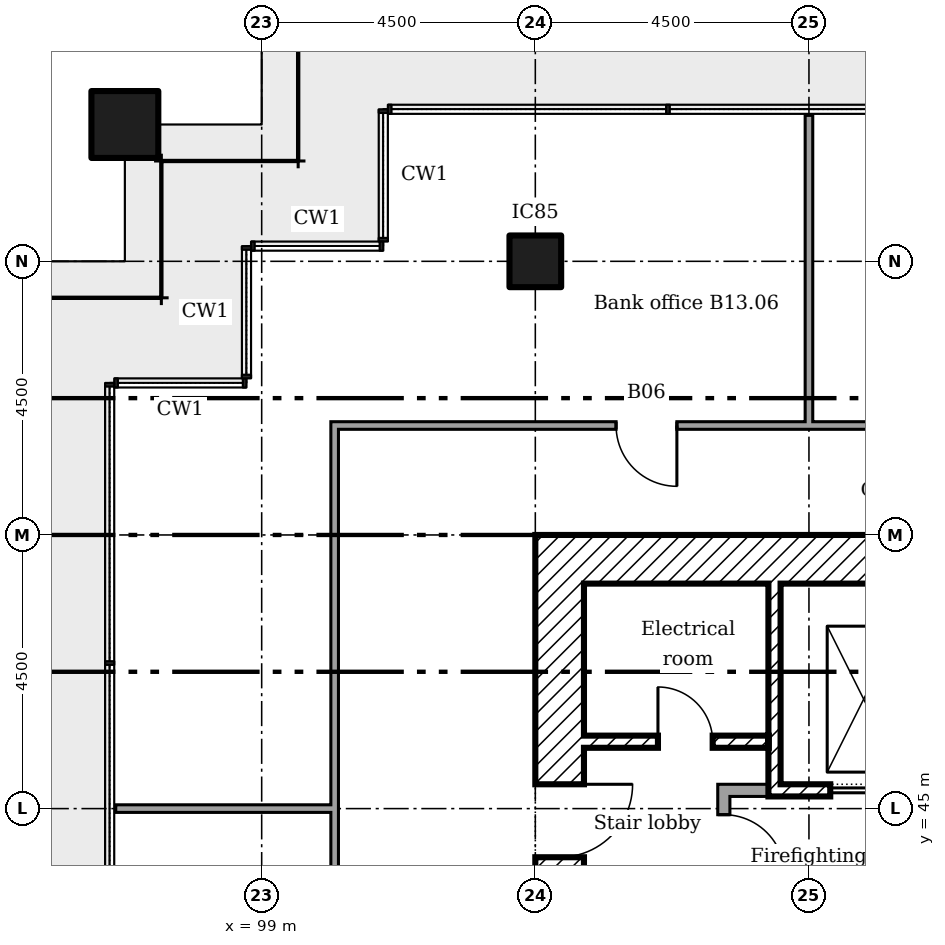
"""IFC4 building model, lengths in metres.
Left out: names, types, materials, properties, quantities, classifications, styles, units other than length and angle.
Written with IfcOpenShell. Run it as: python <this file> out.ifc"""

import sys

from ifc_helpers import new_model, si_unit, direction, frame, frame_2d, origin, origin_2d, place, context, subcontext, project, spatial, rectangle, extrude, element, fill, save


model = new_model("IFC4")
c1 = context("Model", 3, precision=1e-05, world=origin(), true_north=direction((0.0, 1.0)))
c2 = subcontext(c1, "Body", "Model", "MODEL_VIEW")
j1 = project(units=[si_unit("LENGTHUNIT", "METRE"), si_unit("PLANEANGLEUNIT", "RADIAN")], contexts=[c1])
p1 = place(None, origin())
s1 = spatial("IfcSite", under=j1, at=p1, CompositionType="ELEMENT")
p2 = place(p1, origin())
s2 = spatial("IfcBuilding", under=s1, at=p2, CompositionType="ELEMENT")
p3 = place(p2, frame((0.0, 0.0, 58.2)))
s3 = spatial("IfcBuildingStorey", under=s2, at=p3, CompositionType="ELEMENT", Elevation=58.2)
p4 = place(p3, frame((96.75, 56.25, 0.0)))
e1 = element("IfcColumn", 1, at=p4, inside=s3, PredefinedType="COLUMN", context=c2, shape_type="SweptSolid", body=[
    extrude(rectangle(XDim=1.1, YDim=1.1, at=origin_2d()), origin(), (0.0, 0.0, 1.0), 3.6),
])
p5 = place(p3, frame((103.5, 54.0, 0.0)))
e2 = element("IfcColumn", 2, at=p5, inside=s3, PredefinedType="COLUMN", context=c2, shape_type="SweptSolid", body=[
    extrude(rectangle(XDim=0.85, YDim=0.85, at=origin_2d()), origin(), (0.0, 0.0, 1.0), 3.6),
])
p6 = place(p3, frame((104.3, 49.1, 0.0)))
e3 = element("IfcWall", 3, at=p6, inside=s3, PredefinedType="SHEAR", context=c2, shape_type="SweptSolid", body=[
    extrude(rectangle(XDim=11.9, YDim=0.8, at=frame_2d((5.95, 0.0))), origin(), (0.0, 0.0, 1.0), 3.35),
])
p7 = place(p3, frame((103.9, 36.0, 0.0), z_axis=(0.0, 0.0, 1.0), x_axis=(0.0, 1.0, 0.0)))
e4 = element("IfcWall", 4, at=p7, inside=s3, PredefinedType="SHEAR", context=c2, shape_type="SweptSolid", body=[
    extrude(rectangle(XDim=13.5, YDim=0.8, at=frame_2d((6.75, 0.0))), origin(), (0.0, 0.0, 1.0), 3.35),
])
p8 = place(p7, frame((8.2, 0.0, 0.0)))
e5 = element("IfcOpeningElement", 5, at=p8, cuts=e4, PredefinedType="OPENING", context=c2, shape_type="SweptSolid", body=[
    extrude(rectangle(XDim=1.2, YDim=2.1, at=frame_2d((0.6, 1.05))), frame((0.0, 0.41, 0.0), z_axis=(0.0, -1.0, 0.0), x_axis=(1.0, 0.0, 0.0)), (0.0, 0.0, 1.0), 0.82),
])
p9 = place(p7, frame((6.225, 0.0, 0.0)))
e6 = element("IfcOpeningElement", 6, at=p9, cuts=e4, PredefinedType="OPENING", context=c2, shape_type="SweptSolid", body=[
    extrude(rectangle(XDim=1.0, YDim=2.1, at=frame_2d((0.5, 1.05))), frame((0.0, 0.41, 0.0), z_axis=(0.0, -1.0, 0.0), x_axis=(1.0, 0.0, 0.0)), (0.0, 0.0, 1.0), 0.82),
])
p10 = place(p3, frame((107.433, 48.7, 0.0), z_axis=(0.0, 0.0, 1.0), x_axis=(0.0, -1.0, 0.0)))
e7 = element("IfcWall", 7, at=p10, inside=s3, PredefinedType="SHEAR", context=c2, shape_type="SweptSolid", body=[
    extrude(rectangle(XDim=3.5, YDim=0.2, at=frame_2d((1.75, 0.0))), origin(), (0.0, 0.0, 1.0), 3.35),
])
p11 = place(p3, frame((106.5, 45.3, 0.0)))
e8 = element("IfcWall", 8, at=p11, inside=s3, PredefinedType="PARTITIONING", context=c2, shape_type="SweptSolid", body=[
    extrude(rectangle(XDim=0.833, YDim=0.2, at=frame_2d((0.417, 0.0))), origin(), (0.0, 0.0, 1.0), 3.35),
])
p12 = place(p3, frame((106.6, 43.7, 0.0), z_axis=(0.0, 0.0, 1.0), x_axis=(0.0, 1.0, 0.0)))
e9 = element("IfcWall", 9, at=p12, inside=s3, PredefinedType="PARTITIONING", context=c2, shape_type="SweptSolid", body=[
    extrude(rectangle(XDim=1.5, YDim=0.2, at=frame_2d((0.75, 0.0))), origin(), (0.0, 0.0, 1.0), 3.35),
])
p13 = place(p12, frame((0.2, 0.0, 0.0)))
e10 = element("IfcOpeningElement", 10, at=p13, cuts=e9, PredefinedType="OPENING", context=c2, shape_type="SweptSolid", body=[
    extrude(rectangle(XDim=1.0, YDim=2.1, at=frame_2d((0.5, 1.05))), frame((0.0, 0.11, 0.0), z_axis=(0.0, -1.0, 0.0), x_axis=(1.0, 0.0, 0.0)), (0.0, 0.0, 1.0), 0.22),
])
p14 = place(p3, frame((104.3, 46.1, 0.0)))
e11 = element("IfcWall", 11, at=p14, inside=s3, PredefinedType="SHEAR", context=c2, shape_type="SweptSolid", body=[
    extrude(rectangle(XDim=3.033, YDim=0.2, at=frame_2d((1.517, 0.0))), origin(), (0.0, 0.0, 1.0), 3.35),
])
p15 = place(p14, frame((1.217, 0.0, 0.0)))
e12 = element("IfcOpeningElement", 12, at=p15, cuts=e11, PredefinedType="OPENING", context=c2, shape_type="SweptSolid", body=[
    extrude(rectangle(XDim=0.9, YDim=2.1, at=frame_2d((0.45, 1.05))), frame((0.0, 0.11, 0.0), z_axis=(0.0, -1.0, 0.0), x_axis=(1.0, 0.0, 0.0)), (0.0, 0.0, 1.0), 0.22),
])
p16 = place(p3, frame((107.533, 45.3, 0.0)))
e13 = element("IfcWall", 13, at=p16, inside=s3, PredefinedType="SHEAR", context=c2, shape_type="SweptSolid", body=[
    extrude(rectangle(XDim=2.733, YDim=0.2, at=frame_2d((1.367, 0.0))), origin(), (0.0, 0.0, 1.0), 3.35),
])
p17 = place(p16, frame((0.817, 0.0, 0.0)))
e14 = element("IfcOpeningElement", 14, at=p17, cuts=e13, PredefinedType="OPENING", context=c2, shape_type="SweptSolid", body=[
    extrude(rectangle(XDim=1.1, YDim=2.1, at=frame_2d((0.55, 1.05))), frame((0.0, 0.11, 0.0), z_axis=(0.0, -1.0, 0.0), x_axis=(1.0, 0.0, 0.0)), (0.0, 0.0, 1.0), 0.22),
])
p18 = place(p3, frame((96.6, 45.0, 0.0)))
e15 = element("IfcWall", 15, at=p18, inside=s3, PredefinedType="PARTITIONING", context=c2, shape_type="SweptSolid", body=[
    extrude(rectangle(XDim=3.6, YDim=0.125, at=frame_2d((1.8, 0.0))), origin(), (0.0, 0.0, 1.0), 2.851),
])
p19 = place(p3, frame((100.137, 51.3, 0.0)))
e16 = element("IfcWall", 16, at=p19, inside=s3, PredefinedType="PARTITIONING", context=c2, shape_type="SweptSolid", body=[
    extrude(rectangle(XDim=19.325, YDim=0.125, at=frame_2d((9.663, 0.0))), origin(), (0.0, 0.0, 1.0), 3.45),
])
p20 = place(p19, frame((10.619, 0.0, 0.0)))
e17 = element("IfcOpeningElement", 17, at=p20, cuts=e16, PredefinedType="OPENING", context=c2, shape_type="SweptSolid", body=[
    extrude(rectangle(XDim=1.0, YDim=2.1, at=frame_2d((0.5, 1.05))), frame((0.0, 0.073, 0.0), z_axis=(0.0, -1.0, 0.0), x_axis=(1.0, 0.0, 0.0)), (0.0, 0.0, 1.0), 0.145),
])
p21 = place(p19, frame((4.69, 0.0, 0.0)))
e18 = element("IfcOpeningElement", 18, at=p21, cuts=e16, PredefinedType="OPENING", context=c2, shape_type="SweptSolid", body=[
    extrude(rectangle(XDim=1.0, YDim=2.1, at=frame_2d((0.5, 1.05))), frame((0.0, 0.073, 0.0), z_axis=(0.0, -1.0, 0.0), x_axis=(1.0, 0.0, 0.0)), (0.0, 0.0, 1.0), 0.145),
])
p22 = place(p3, frame((100.2, 33.363, 0.0), z_axis=(0.0, 0.0, 1.0), x_axis=(0.0, 1.0, 0.0)))
e19 = element("IfcWall", 19, at=p22, inside=s3, PredefinedType="PARTITIONING", context=c2, shape_type="SweptSolid", body=[
    extrude(rectangle(XDim=17.875, YDim=0.125, at=frame_2d((8.938, 0.0))), origin(), (0.0, 0.0, 1.0), 3.45),
])
p23 = place(p22, frame((5.288, 0.0, 0.0)))
e20 = element("IfcOpeningElement", 20, at=p23, cuts=e19, PredefinedType="OPENING", context=c2, shape_type="SweptSolid", body=[
    extrude(rectangle(XDim=1.0, YDim=2.1, at=frame_2d((0.5, 1.05))), frame((0.0, 0.073, 0.0), z_axis=(0.0, -1.0, 0.0), x_axis=(1.0, 0.0, 0.0)), (0.0, 0.0, 1.0), 0.145),
])
p24 = place(p3, frame((108.0, 51.3, 0.0), z_axis=(0.0, 0.0, 1.0), x_axis=(0.0, 1.0, 0.0)))
e21 = element("IfcWall", 21, at=p24, inside=s3, PredefinedType="PARTITIONING", context=c2, shape_type="SweptSolid", body=[
    extrude(rectangle(XDim=5.1, YDim=0.125, at=frame_2d((2.55, 0.0))), origin(), (0.0, 0.0, 1.0), 2.851),
])
p25 = place(p8, frame((1.2, 0.0, 0.0), x_axis=(-1.0, 0.0, 0.0)))
e22 = element("IfcDoor", 22, at=p25, inside=s3, OperationType="SINGLE_SWING_RIGHT", PredefinedType="DOOR", context=c2, shape_type="SweptSolid", body=[
    extrude(rectangle(XDim=1.2, YDim=2.1, at=frame_2d((0.6, 1.05))), frame((0.0, 0.025, 0.0), z_axis=(0.0, -1.0, 0.0), x_axis=(1.0, 0.0, 0.0)), (0.0, 0.0, 1.0), 0.05),
])
fill(e5, e22)
p26 = place(p13, frame((1.0, 0.0, 0.0), x_axis=(-1.0, 0.0, 0.0)))
e23 = element("IfcDoor", 23, at=p26, inside=s3, OperationType="SINGLE_SWING_LEFT", PredefinedType="DOOR", context=c2, shape_type="SweptSolid", body=[
    extrude(rectangle(XDim=1.0, YDim=2.1, at=frame_2d((0.5, 1.05))), frame((0.0, 0.025, 0.0), z_axis=(0.0, -1.0, 0.0), x_axis=(1.0, 0.0, 0.0)), (0.0, 0.0, 1.0), 0.05),
])
fill(e10, e23)
p27 = place(p15, origin())
e24 = element("IfcDoor", 24, at=p27, inside=s3, OperationType="SINGLE_SWING_RIGHT", PredefinedType="DOOR", context=c2, shape_type="SweptSolid", body=[
    extrude(rectangle(XDim=0.9, YDim=2.1, at=frame_2d((0.45, 1.05))), frame((0.0, 0.025, 0.0), z_axis=(0.0, -1.0, 0.0), x_axis=(1.0, 0.0, 0.0)), (0.0, 0.0, 1.0), 0.05),
])
fill(e12, e24)
p28 = place(p17, origin())
e25 = element("IfcDoor", 25, at=p28, inside=s3, OperationType="SLIDING_TO_LEFT", PredefinedType="DOOR", context=c2, shape_type="SweptSolid", body=[
    extrude(rectangle(XDim=1.1, YDim=2.1, at=frame_2d((0.55, 1.05))), frame((0.0, 0.025, 0.0), z_axis=(0.0, -1.0, 0.0), x_axis=(1.0, 0.0, 0.0)), (0.0, 0.0, 1.0), 0.05),
])
fill(e14, e25)
p29 = place(p21, frame((1.0, 0.0, 0.0), x_axis=(-1.0, 0.0, 0.0)))
e26 = element("IfcDoor", 26, at=p29, inside=s3, OperationType="SINGLE_SWING_RIGHT", PredefinedType="DOOR", context=c2, shape_type="SweptSolid", body=[
    extrude(rectangle(XDim=1.0, YDim=2.1, at=frame_2d((0.5, 1.05))), frame((0.0, 0.025, 0.0), z_axis=(0.0, -1.0, 0.0), x_axis=(1.0, 0.0, 0.0)), (0.0, 0.0, 1.0), 0.05),
])
fill(e18, e26)
save(model, sys.argv[1])
